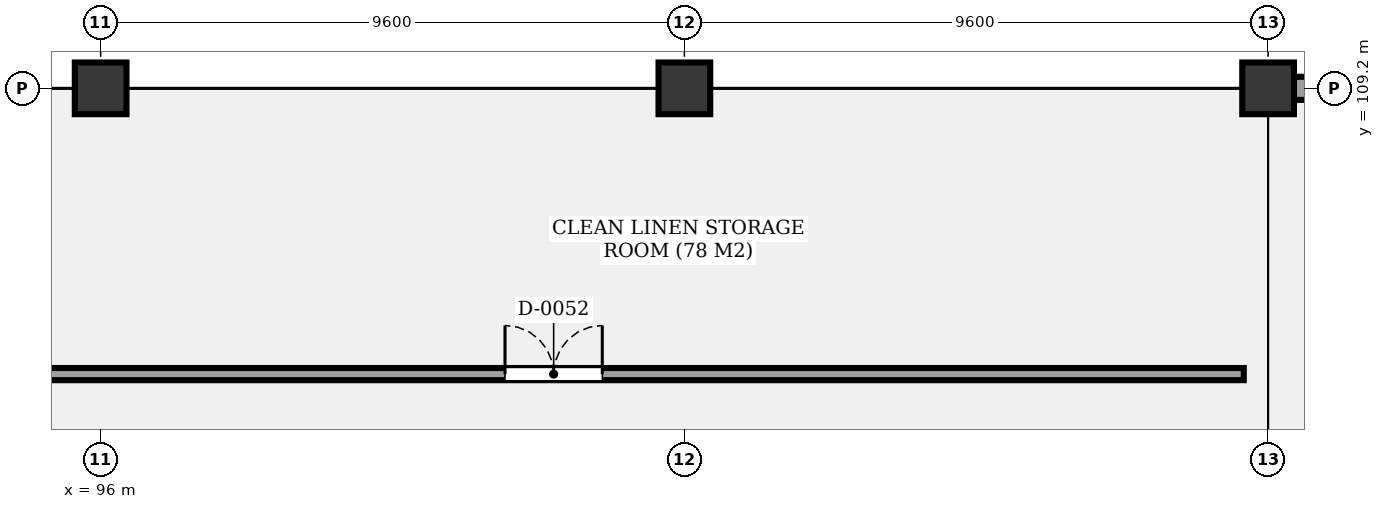
"""IFC4 building model, lengths in metres.
Left out: names, types, materials, properties, quantities, classifications, styles, units other than length and angle.
Written with IfcOpenShell. Run it as: python <this file> out.ifc"""

import sys

from ifc_helpers import new_model, si_unit, direction, frame, frame_2d, origin, origin_2d, place, context, subcontext, project, spatial, rectangle, extrude, element, fill, save


model = new_model("IFC4")
c1 = context("Model", 3, precision=1e-05, world=origin(), true_north=direction((0.0, 1.0)))
c2 = subcontext(c1, "Body", "Model", "MODEL_VIEW")
j1 = project(units=[si_unit("LENGTHUNIT", "METRE"), si_unit("PLANEANGLEUNIT", "RADIAN")], contexts=[c1])
p1 = place(None, origin())
s1 = spatial("IfcSite", under=j1, at=p1, CompositionType="ELEMENT")
p2 = place(p1, origin())
s2 = spatial("IfcBuilding", under=s1, at=p2, CompositionType="ELEMENT")
p3 = place(p2, origin())
s3 = spatial("IfcBuildingStorey", under=s2, at=p3, CompositionType="ELEMENT", Elevation=0.0)
for number, where, z_axis, x_axis in (
    (1, (96.0, 109.2, -0.35), (0.0, 0.0, 1.0), (1.0, 0.0, 0.0)),
    (2, (105.6, 109.2, -0.35), (0.0, 0.0, 1.0), (1.0, 0.0, 0.0)),
    (3, (115.2, 109.2, -0.35), (0.0, 0.0, 1.0), (1.0, 0.0, 0.0)),
):
    element("IfcColumn", number, at=place(p3, frame(where, z_axis=z_axis, x_axis=x_axis)), inside=s3, PredefinedType="COLUMN", context=c2, shape_type="SweptSolid", body=[
        extrude(rectangle(XDim=0.85, YDim=0.85, at=origin_2d()), origin(), (0.0, 0.0, 1.0), 5.45),
    ])
p4 = place(p3, frame((115.2, 109.2, 0.0), z_axis=(0.0, 0.0, 1.0), x_axis=(1.0, 0.0, 0.0)))
e4 = element("IfcWall", 4, at=p4, inside=s3, PredefinedType="SOLIDWALL", context=c2, shape_type="SweptSolid", body=[
    extrude(rectangle(XDim=9.6, YDim=0.38, at=frame_2d((4.8, 0.0))), origin(), (0.0, 0.0, 1.0), 4.24),
])
p5 = place(p4, frame((3.1, 0.0, 0.85)))
e5 = element("IfcOpeningElement", 5, at=p5, cuts=e4, PredefinedType="OPENING", context=c2, shape_type="SweptSolid", body=[
    extrude(rectangle(XDim=3.4, YDim=1.4, at=frame_2d((1.7, 0.7))), frame((0.0, 0.2, 0.0), z_axis=(0.0, -1.0, 0.0), x_axis=(1.0, 0.0, 0.0)), (0.0, 0.0, 1.0), 0.4),
])
p6 = place(p3, frame((58.0, 104.5, 0.0), z_axis=(0.0, 0.0, 1.0), x_axis=(1.0, 0.0, 0.0)))
e6 = element("IfcWall", 6, at=p6, inside=s3, PredefinedType="PARTITIONING", context=c2, shape_type="SweptSolid", body=[
    extrude(rectangle(XDim=56.8, YDim=0.2, at=frame_2d((28.4, 0.0))), origin(), (0.0, 0.0, 1.0), 3.98),
])
p7 = place(p6, frame((13.65, 0.0, 0.0)))
e7 = element("IfcOpeningElement", 7, at=p7, cuts=e6, PredefinedType="OPENING", context=c2, shape_type="SweptSolid", body=[
    extrude(rectangle(XDim=1.8, YDim=2.2, at=frame_2d((0.9, 1.1))), frame((0.0, 0.11, 0.0), z_axis=(0.0, -1.0, 0.0), x_axis=(1.0, 0.0, 0.0)), (0.0, 0.0, 1.0), 0.22),
])
p8 = place(p6, frame((44.65, 0.0, 0.0)))
e8 = element("IfcOpeningElement", 8, at=p8, cuts=e6, PredefinedType="OPENING", context=c2, shape_type="SweptSolid", body=[
    extrude(rectangle(XDim=1.6, YDim=2.2, at=frame_2d((0.8, 1.1))), frame((0.0, 0.11, 0.0), z_axis=(0.0, -1.0, 0.0), x_axis=(1.0, 0.0, 0.0)), (0.0, 0.0, 1.0), 0.22),
])
p9 = place(p8, origin())
e9 = element("IfcDoor", 9, at=p9, inside=s3, OperationType="DOUBLE_DOOR_SINGLE_SWING", PredefinedType="DOOR", context=c2, shape_type="SweptSolid", body=[
    extrude(rectangle(XDim=1.6, YDim=2.2, at=frame_2d((0.8, 1.1))), frame((0.0, 0.025, 0.0), z_axis=(0.0, -1.0, 0.0), x_axis=(1.0, 0.0, 0.0)), (0.0, 0.0, 1.0), 0.05),
])
fill(e8, e9)
save(model, sys.argv[1])
